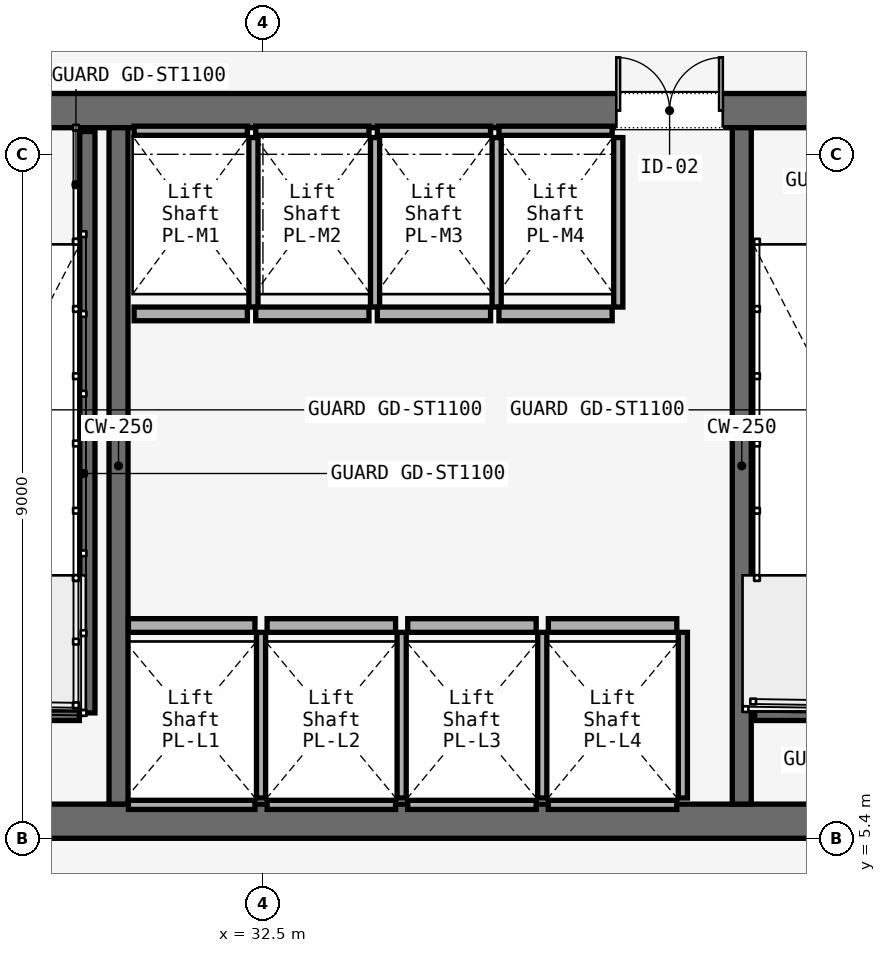
"""IFC4 building model, lengths in metres.
Left out: names, types, materials, properties, quantities, classifications, styles, units other than length and angle.
Written with IfcOpenShell. Run it as: python <this file> out.ifc"""

import sys

from ifc_helpers import new_model, si_unit, direction, frame, frame_2d, origin, place, context, subcontext, project, spatial, rectangle, extrude, element, fill, save


model = new_model("IFC4")
c1 = context("Model", 3, precision=1e-05, world=origin(), true_north=direction((0.0, 1.0)))
c2 = subcontext(c1, "Body", "Model", "MODEL_VIEW")
j1 = project(units=[si_unit("LENGTHUNIT", "METRE"), si_unit("PLANEANGLEUNIT", "RADIAN")], contexts=[c1])
p1 = place(None, origin())
s1 = spatial("IfcSite", under=j1, at=p1, CompositionType="ELEMENT")
p2 = place(p1, origin())
s2 = spatial("IfcBuilding", under=s1, at=p2, CompositionType="ELEMENT")
p3 = place(p2, frame((0.0, 0.0, 6.0)))
s3 = spatial("IfcBuildingStorey", under=s2, at=p3, CompositionType="ELEMENT", Elevation=6.0)
p4 = place(p3, frame((26.45, 14.975, 0.0), z_axis=(0.0, 0.0, 1.0), x_axis=(1.0, 0.0, 0.0)))
e1 = element("IfcWall", 1, at=p4, inside=s3, PredefinedType="SOLIDWALL", context=c2, shape_type="SweptSolid", body=[
    extrude(rectangle(XDim=31.1, YDim=0.45, at=frame_2d((15.55, 0.0))), origin(), (0.0, 0.0, 1.0), 5.7),
])
p5 = place(p4, frame((1.65, 0.0, 0.0)))
e2 = element("IfcOpeningElement", 2, at=p5, cuts=e1, PredefinedType="OPENING", context=c2, shape_type="SweptSolid", body=[
    extrude(rectangle(XDim=1.1, YDim=2.2, at=frame_2d((0.55, 1.1))), frame((0.0, 0.225, 0.0), z_axis=(0.0, -1.0, 0.0), x_axis=(1.0, 0.0, 0.0)), (0.0, 0.0, 1.0), 0.45),
])
p6 = place(p4, frame((13.65, 0.0, 0.0)))
e3 = element("IfcOpeningElement", 3, at=p6, cuts=e1, PredefinedType="OPENING", context=c2, shape_type="SweptSolid", body=[
    extrude(rectangle(XDim=1.1, YDim=2.2, at=frame_2d((0.55, 1.1))), frame((0.0, 0.225, 0.0), z_axis=(0.0, -1.0, 0.0), x_axis=(1.0, 0.0, 0.0)), (0.0, 0.0, 1.0), 0.45),
])
p7 = place(p4, frame((25.55, 0.0, 0.0)))
e4 = element("IfcOpeningElement", 4, at=p7, cuts=e1, PredefinedType="OPENING", context=c2, shape_type="SweptSolid", body=[
    extrude(rectangle(XDim=1.1, YDim=2.2, at=frame_2d((0.55, 1.1))), frame((0.0, 0.225, 0.0), z_axis=(0.0, -1.0, 0.0), x_axis=(1.0, 0.0, 0.0)), (0.0, 0.0, 1.0), 0.45),
])
p8 = place(p4, frame((10.7, 0.0, 0.0)))
e5 = element("IfcOpeningElement", 5, at=p8, cuts=e1, PredefinedType="OPENING", context=c2, shape_type="SweptSolid", body=[
    extrude(rectangle(XDim=1.4, YDim=2.2, at=frame_2d((0.7, 1.1))), frame((0.0, 0.225, 0.0), z_axis=(0.0, -1.0, 0.0), x_axis=(1.0, 0.0, 0.0)), (0.0, 0.0, 1.0), 0.45),
])
p9 = place(p4, frame((19.35, 0.0, 0.0)))
e6 = element("IfcOpeningElement", 6, at=p9, cuts=e1, PredefinedType="OPENING", context=c2, shape_type="SweptSolid", body=[
    extrude(rectangle(XDim=1.1, YDim=2.2, at=frame_2d((0.55, 1.1))), frame((0.0, 0.225, 0.0), z_axis=(0.0, -1.0, 0.0), x_axis=(1.0, 0.0, 0.0)), (0.0, 0.0, 1.0), 0.45),
])
p10 = place(p4, frame((21.4, 0.0, 0.0)))
e7 = element("IfcOpeningElement", 7, at=p10, cuts=e1, PredefinedType="OPENING", context=c2, shape_type="SweptSolid", body=[
    extrude(rectangle(XDim=0.9, YDim=2.1, at=frame_2d((0.45, 1.05))), frame((0.0, 0.225, 0.0), z_axis=(0.0, -1.0, 0.0), x_axis=(1.0, 0.0, 0.0)), (0.0, 0.0, 1.0), 0.45),
])
p11 = place(p4, frame((23.35, 0.0, 0.0)))
e8 = element("IfcOpeningElement", 8, at=p11, cuts=e1, PredefinedType="OPENING", context=c2, shape_type="SweptSolid", body=[
    extrude(rectangle(XDim=1.3, YDim=2.3, at=frame_2d((0.65, 1.15))), frame((0.0, 0.225, 0.0), z_axis=(0.0, -1.0, 0.0), x_axis=(1.0, 0.0, 0.0)), (0.0, 0.0, 1.0), 0.45),
])
p12 = place(p3, frame((26.45, 5.625, 0.0), z_axis=(0.0, 0.0, 1.0), x_axis=(1.0, 0.0, 0.0)))
e9 = element("IfcWall", 9, at=p12, inside=s3, PredefinedType="SOLIDWALL", context=c2, shape_type="SweptSolid", body=[
    extrude(rectangle(XDim=31.1, YDim=0.45, at=frame_2d((15.55, 0.0))), origin(), (0.0, 0.0, 1.0), 5.7),
])
for number, where, z_axis, x_axis in (
    (10, (30.6, 5.85, 0.0), (0.0, 0.0, 1.0), (0.0, 1.0, 0.0)),
    (11, (38.8, 5.85, 0.0), (0.0, 0.0, 1.0), (0.0, 1.0, 0.0)),
):
    element("IfcWall", number, at=place(p3, frame(where, z_axis=z_axis, x_axis=x_axis)), inside=s3, PredefinedType="SOLIDWALL", context=c2, shape_type="SweptSolid", body=[
        extrude(rectangle(XDim=8.9, YDim=0.25, at=frame_2d((4.45, 0.0))), origin(), (0.0, 0.0, 1.0), 5.7),
    ])
p13 = place(p3, frame((30.19, 14.7, 0.0), z_axis=(0.0, 0.0, 1.0), x_axis=(0.0, -1.0, 0.0)))
e12 = element("IfcWall", 12, at=p13, inside=s3, PredefinedType="SOLIDWALL", context=c2, shape_type="SweptSolid", body=[
    extrude(rectangle(XDim=7.65, YDim=0.2, at=frame_2d((3.825, 0.0))), origin(), (0.0, 0.0, 1.0), 6.0),
])
for number, where, z_axis, x_axis in (
    (13, (26.97, 7.05, 0.0), (0.0, 0.0, 1.0), (1.0, 0.0, 0.0)),
    (14, (38.97, 7.05, 0.0), (0.0, 0.0, 1.0), (1.0, 0.0, 0.0)),
):
    element("IfcWall", number, at=place(p3, frame(where, z_axis=z_axis, x_axis=x_axis)), inside=s3, PredefinedType="SOLIDWALL", context=c2, shape_type="SweptSolid", body=[
        extrude(rectangle(XDim=3.115, YDim=0.2, at=frame_2d((1.558, 0.0))), origin(), (0.0, 0.0, 1.0), 6.0),
    ])
p14 = place(p3, frame((30.73, 8.2, 0.0), z_axis=(0.0, 0.0, 1.0), x_axis=(1.0, 0.0, 0.0)))
e15 = element("IfcWall", 15, at=p14, inside=s3, PredefinedType="SOLIDWALL", context=c2, shape_type="SweptSolid", body=[
    extrude(rectangle(XDim=1.665, YDim=0.18, at=frame_2d((0.833, 0.0))), origin(), (0.0, 0.0, 1.0), 4.819),
])
p15 = place(p3, frame((30.73, 5.84, 0.0), z_axis=(0.0, 0.0, 1.0), x_axis=(1.0, 0.0, 0.0)))
e16 = element("IfcWall", 16, at=p15, inside=s3, PredefinedType="SOLIDWALL", context=c2, shape_type="SweptSolid", body=[
    extrude(rectangle(XDim=1.665, YDim=0.12, at=frame_2d((0.833, 0.0))), origin(), (0.0, 0.0, 1.0), 4.819),
])
p16 = place(p3, frame((32.475, 5.93, 0.0), z_axis=(0.0, 0.0, 1.0), x_axis=(0.0, 1.0, 0.0)))
e17 = element("IfcWall", 17, at=p16, inside=s3, PredefinedType="SOLIDWALL", context=c2, shape_type="SweptSolid", body=[
    extrude(rectangle(XDim=2.18, YDim=0.12, at=frame_2d((1.09, 0.0))), origin(), (0.0, 0.0, 1.0), 4.819),
])
p17 = place(p3, frame((32.555, 8.2, 0.0), z_axis=(0.0, 0.0, 1.0), x_axis=(1.0, 0.0, 0.0)))
e18 = element("IfcWall", 18, at=p17, inside=s3, PredefinedType="SOLIDWALL", context=c2, shape_type="SweptSolid", body=[
    extrude(rectangle(XDim=1.69, YDim=0.18, at=frame_2d((0.845, 0.0))), origin(), (0.0, 0.0, 1.0), 4.819),
])
p18 = place(p3, frame((32.555, 5.84, 0.0), z_axis=(0.0, 0.0, 1.0), x_axis=(1.0, 0.0, 0.0)))
e19 = element("IfcWall", 19, at=p18, inside=s3, PredefinedType="SOLIDWALL", context=c2, shape_type="SweptSolid", body=[
    extrude(rectangle(XDim=1.69, YDim=0.12, at=frame_2d((0.845, 0.0))), origin(), (0.0, 0.0, 1.0), 4.819),
])
p19 = place(p3, frame((34.325, 5.93, 0.0), z_axis=(0.0, 0.0, 1.0), x_axis=(0.0, 1.0, 0.0)))
e20 = element("IfcWall", 20, at=p19, inside=s3, PredefinedType="SOLIDWALL", context=c2, shape_type="SweptSolid", body=[
    extrude(rectangle(XDim=2.18, YDim=0.12, at=frame_2d((1.09, 0.0))), origin(), (0.0, 0.0, 1.0), 4.819),
])
p20 = place(p3, frame((34.405, 8.2, 0.0), z_axis=(0.0, 0.0, 1.0), x_axis=(1.0, 0.0, 0.0)))
e21 = element("IfcWall", 21, at=p20, inside=s3, PredefinedType="SOLIDWALL", context=c2, shape_type="SweptSolid", body=[
    extrude(rectangle(XDim=1.69, YDim=0.18, at=frame_2d((0.845, 0.0))), origin(), (0.0, 0.0, 1.0), 4.819),
])
p21 = place(p3, frame((34.405, 5.84, 0.0), z_axis=(0.0, 0.0, 1.0), x_axis=(1.0, 0.0, 0.0)))
e22 = element("IfcWall", 22, at=p21, inside=s3, PredefinedType="SOLIDWALL", context=c2, shape_type="SweptSolid", body=[
    extrude(rectangle(XDim=1.69, YDim=0.12, at=frame_2d((0.845, 0.0))), origin(), (0.0, 0.0, 1.0), 4.819),
])
p22 = place(p3, frame((36.175, 5.93, 0.0), z_axis=(0.0, 0.0, 1.0), x_axis=(0.0, 1.0, 0.0)))
e23 = element("IfcWall", 23, at=p22, inside=s3, PredefinedType="SOLIDWALL", context=c2, shape_type="SweptSolid", body=[
    extrude(rectangle(XDim=2.18, YDim=0.12, at=frame_2d((1.09, 0.0))), origin(), (0.0, 0.0, 1.0), 4.819),
])
p23 = place(p3, frame((36.255, 8.2, 0.0), z_axis=(0.0, 0.0, 1.0), x_axis=(1.0, 0.0, 0.0)))
e24 = element("IfcWall", 24, at=p23, inside=s3, PredefinedType="SOLIDWALL", context=c2, shape_type="SweptSolid", body=[
    extrude(rectangle(XDim=1.69, YDim=0.18, at=frame_2d((0.845, 0.0))), origin(), (0.0, 0.0, 1.0), 4.819),
])
p24 = place(p3, frame((36.255, 5.84, 0.0), z_axis=(0.0, 0.0, 1.0), x_axis=(1.0, 0.0, 0.0)))
e25 = element("IfcWall", 25, at=p24, inside=s3, PredefinedType="SOLIDWALL", context=c2, shape_type="SweptSolid", body=[
    extrude(rectangle(XDim=1.69, YDim=0.12, at=frame_2d((0.845, 0.0))), origin(), (0.0, 0.0, 1.0), 4.819),
])
p25 = place(p3, frame((38.025, 5.93, 0.0), z_axis=(0.0, 0.0, 1.0), x_axis=(0.0, 1.0, 0.0)))
e26 = element("IfcWall", 26, at=p25, inside=s3, PredefinedType="SOLIDWALL", context=c2, shape_type="SweptSolid", body=[
    extrude(rectangle(XDim=2.18, YDim=0.12, at=frame_2d((1.09, 0.0))), origin(), (0.0, 0.0, 1.0), 4.819),
])
p26 = place(p3, frame((30.805, 12.3, 0.0), z_axis=(0.0, 0.0, 1.0), x_axis=(1.0, 0.0, 0.0)))
e27 = element("IfcWall", 27, at=p26, inside=s3, PredefinedType="SOLIDWALL", context=c2, shape_type="SweptSolid", body=[
    extrude(rectangle(XDim=1.49, YDim=0.18, at=frame_2d((0.745, 0.0))), origin(), (0.0, 0.0, 1.0), 4.819),
])
p27 = place(p3, frame((30.805, 14.71, 0.0), z_axis=(0.0, 0.0, 1.0), x_axis=(1.0, 0.0, 0.0)))
e28 = element("IfcWall", 28, at=p27, inside=s3, PredefinedType="SOLIDWALL", context=c2, shape_type="SweptSolid", body=[
    extrude(rectangle(XDim=1.49, YDim=0.12, at=frame_2d((0.745, 0.0))), origin(), (0.0, 0.0, 1.0), 4.819),
])
p28 = place(p3, frame((32.375, 12.39, 0.0), z_axis=(0.0, 0.0, 1.0), x_axis=(0.0, 1.0, 0.0)))
e29 = element("IfcWall", 29, at=p28, inside=s3, PredefinedType="SOLIDWALL", context=c2, shape_type="SweptSolid", body=[
    extrude(rectangle(XDim=2.23, YDim=0.12, at=frame_2d((1.115, 0.0))), origin(), (0.0, 0.0, 1.0), 4.819),
])
p29 = place(p3, frame((32.405, 12.3, 0.0), z_axis=(0.0, 0.0, 1.0), x_axis=(1.0, 0.0, 0.0)))
e30 = element("IfcWall", 30, at=p29, inside=s3, PredefinedType="SOLIDWALL", context=c2, shape_type="SweptSolid", body=[
    extrude(rectangle(XDim=1.49, YDim=0.18, at=frame_2d((0.745, 0.0))), origin(), (0.0, 0.0, 1.0), 4.819),
])
p30 = place(p3, frame((32.405, 14.71, 0.0), z_axis=(0.0, 0.0, 1.0), x_axis=(1.0, 0.0, 0.0)))
e31 = element("IfcWall", 31, at=p30, inside=s3, PredefinedType="SOLIDWALL", context=c2, shape_type="SweptSolid", body=[
    extrude(rectangle(XDim=1.49, YDim=0.12, at=frame_2d((0.745, 0.0))), origin(), (0.0, 0.0, 1.0), 4.819),
])
p31 = place(p3, frame((33.975, 12.39, 0.0), z_axis=(0.0, 0.0, 1.0), x_axis=(0.0, 1.0, 0.0)))
e32 = element("IfcWall", 32, at=p31, inside=s3, PredefinedType="SOLIDWALL", context=c2, shape_type="SweptSolid", body=[
    extrude(rectangle(XDim=2.23, YDim=0.12, at=frame_2d((1.115, 0.0))), origin(), (0.0, 0.0, 1.0), 4.819),
])
p32 = place(p3, frame((34.005, 12.3, 0.0), z_axis=(0.0, 0.0, 1.0), x_axis=(1.0, 0.0, 0.0)))
e33 = element("IfcWall", 33, at=p32, inside=s3, PredefinedType="SOLIDWALL", context=c2, shape_type="SweptSolid", body=[
    extrude(rectangle(XDim=1.49, YDim=0.18, at=frame_2d((0.745, 0.0))), origin(), (0.0, 0.0, 1.0), 4.819),
])
p33 = place(p3, frame((34.005, 14.71, 0.0), z_axis=(0.0, 0.0, 1.0), x_axis=(1.0, 0.0, 0.0)))
e34 = element("IfcWall", 34, at=p33, inside=s3, PredefinedType="SOLIDWALL", context=c2, shape_type="SweptSolid", body=[
    extrude(rectangle(XDim=1.49, YDim=0.12, at=frame_2d((0.745, 0.0))), origin(), (0.0, 0.0, 1.0), 4.819),
])
p34 = place(p3, frame((35.575, 12.39, 0.0), z_axis=(0.0, 0.0, 1.0), x_axis=(0.0, 1.0, 0.0)))
e35 = element("IfcWall", 35, at=p34, inside=s3, PredefinedType="SOLIDWALL", context=c2, shape_type="SweptSolid", body=[
    extrude(rectangle(XDim=2.23, YDim=0.12, at=frame_2d((1.115, 0.0))), origin(), (0.0, 0.0, 1.0), 4.819),
])
p35 = place(p3, frame((35.605, 12.3, 0.0), z_axis=(0.0, 0.0, 1.0), x_axis=(1.0, 0.0, 0.0)))
e36 = element("IfcWall", 36, at=p35, inside=s3, PredefinedType="SOLIDWALL", context=c2, shape_type="SweptSolid", body=[
    extrude(rectangle(XDim=1.49, YDim=0.18, at=frame_2d((0.745, 0.0))), origin(), (0.0, 0.0, 1.0), 4.819),
])
p36 = place(p3, frame((35.605, 14.71, 0.0), z_axis=(0.0, 0.0, 1.0), x_axis=(1.0, 0.0, 0.0)))
e37 = element("IfcWall", 37, at=p36, inside=s3, PredefinedType="SOLIDWALL", context=c2, shape_type="SweptSolid", body=[
    extrude(rectangle(XDim=1.49, YDim=0.12, at=frame_2d((0.745, 0.0))), origin(), (0.0, 0.0, 1.0), 4.819),
])
p37 = place(p3, frame((37.175, 12.39, 0.0), z_axis=(0.0, 0.0, 1.0), x_axis=(0.0, 1.0, 0.0)))
e38 = element("IfcWall", 38, at=p37, inside=s3, PredefinedType="SOLIDWALL", context=c2, shape_type="SweptSolid", body=[
    extrude(rectangle(XDim=2.23, YDim=0.12, at=frame_2d((1.115, 0.0))), origin(), (0.0, 0.0, 1.0), 4.819),
])
p38 = place(p8, origin())
e39 = element("IfcDoor", 39, at=p38, inside=s3, OperationType="DOUBLE_DOOR_SINGLE_SWING", PredefinedType="DOOR", context=c2, shape_type="SweptSolid", body=[
    extrude(rectangle(XDim=1.4, YDim=2.2, at=frame_2d((0.7, 1.1))), frame((0.0, 0.025, 0.0), z_axis=(0.0, -1.0, 0.0), x_axis=(1.0, 0.0, 0.0)), (0.0, 0.0, 1.0), 0.05),
])
fill(e5, e39)
save(model, sys.argv[1])
